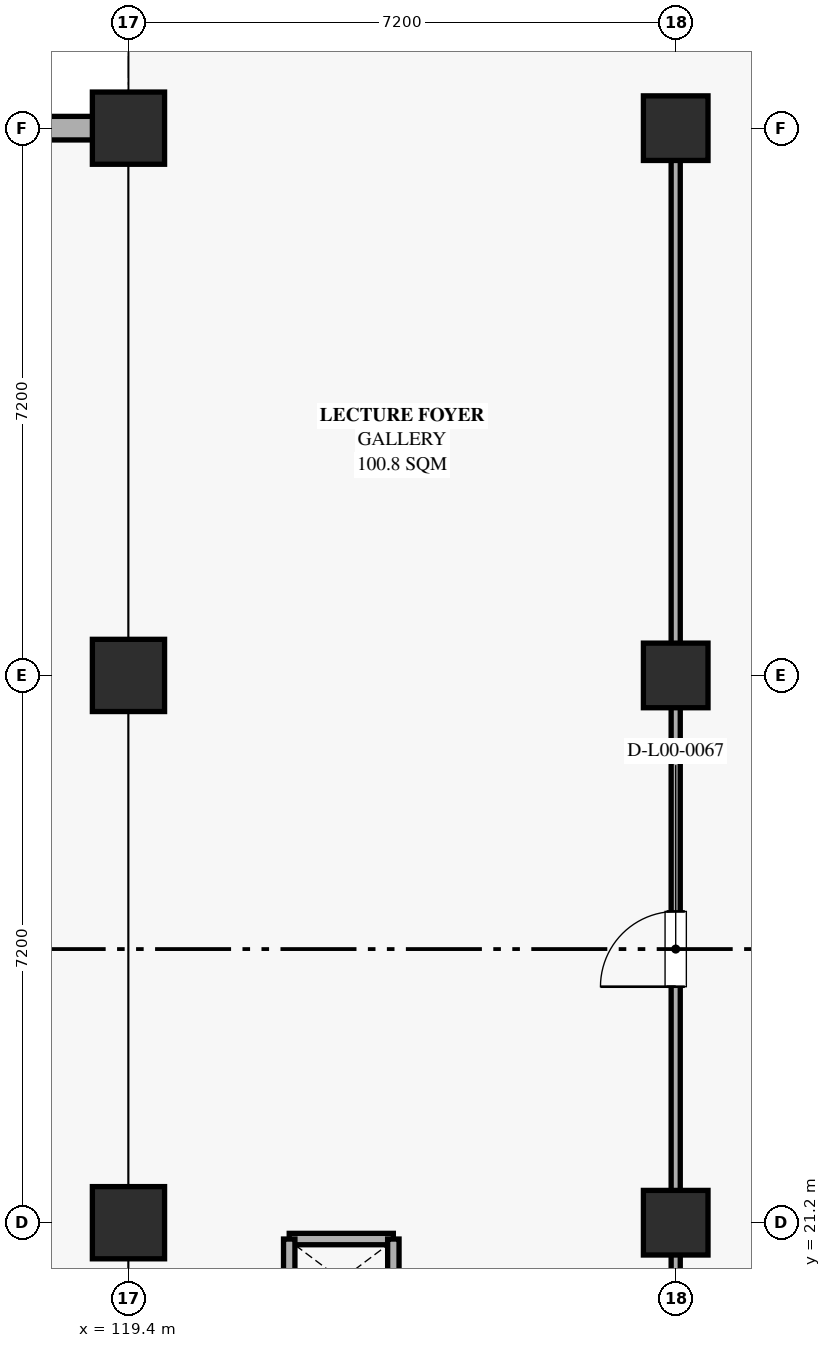
"""IFC4 building model, lengths in metres.
Left out: names, types, materials, properties, quantities, classifications, styles, units other than length and angle.
Written with IfcOpenShell. Run it as: python <this file> out.ifc"""

import sys

from ifc_helpers import new_model, si_unit, direction, frame, frame_2d, origin, origin_2d, place, context, subcontext, project, spatial, rectangle, extrude, element, fill, save


model = new_model("IFC4")
c1 = context("Model", 3, precision=1e-05, world=origin(), true_north=direction((0.0, 1.0)))
c2 = subcontext(c1, "Body", "Model", "MODEL_VIEW")
j1 = project(units=[si_unit("LENGTHUNIT", "METRE"), si_unit("PLANEANGLEUNIT", "RADIAN")], contexts=[c1])
p1 = place(None, origin())
s1 = spatial("IfcSite", under=j1, at=p1, CompositionType="ELEMENT")
p2 = place(p1, origin())
s2 = spatial("IfcBuilding", under=s1, at=p2, CompositionType="ELEMENT")
p3 = place(p2, origin())
s3 = spatial("IfcBuildingStorey", under=s2, at=p3, CompositionType="ELEMENT", Elevation=0.0)
p4 = place(p3, frame((119.4, 21.2, 0.0), z_axis=(0.0, 0.0, 1.0), x_axis=(1.0, 0.0, 0.0)))
e1 = element("IfcColumn", 1, at=p4, inside=s3, PredefinedType="COLUMN", context=c2, shape_type="SweptSolid", body=[
    extrude(rectangle(XDim=0.95, YDim=0.95, at=origin_2d()), origin(), (0.0, 0.0, 1.0), 5.4),
])
p5 = place(p3, frame((126.6, 21.2, 0.0), z_axis=(0.0, 0.0, 1.0), x_axis=(1.0, 0.0, 0.0)))
e2 = element("IfcColumn", 2, at=p5, inside=s3, PredefinedType="COLUMN", context=c2, shape_type="SweptSolid", body=[
    extrude(rectangle(XDim=0.85, YDim=0.85, at=origin_2d()), origin(), (0.0, 0.0, 1.0), 5.4),
])
p6 = place(p3, frame((119.4, 28.4, 0.0), z_axis=(0.0, 0.0, 1.0), x_axis=(1.0, 0.0, 0.0)))
e3 = element("IfcColumn", 3, at=p6, inside=s3, PredefinedType="COLUMN", context=c2, shape_type="SweptSolid", body=[
    extrude(rectangle(XDim=0.95, YDim=0.95, at=origin_2d()), origin(), (0.0, 0.0, 1.0), 5.4),
])
p7 = place(p3, frame((126.6, 28.4, 0.0), z_axis=(0.0, 0.0, 1.0), x_axis=(1.0, 0.0, 0.0)))
e4 = element("IfcColumn", 4, at=p7, inside=s3, PredefinedType="COLUMN", context=c2, shape_type="SweptSolid", body=[
    extrude(rectangle(XDim=0.85, YDim=0.85, at=origin_2d()), origin(), (0.0, 0.0, 1.0), 5.4),
])
p8 = place(p3, frame((119.4, 35.6, 0.0), z_axis=(0.0, 0.0, 1.0), x_axis=(1.0, 0.0, 0.0)))
e5 = element("IfcColumn", 5, at=p8, inside=s3, PredefinedType="COLUMN", context=c2, shape_type="SweptSolid", body=[
    extrude(rectangle(XDim=0.95, YDim=0.95, at=origin_2d()), origin(), (0.0, 0.0, 1.0), 5.4),
])
p9 = place(p3, frame((126.6, 35.6, 0.0), z_axis=(0.0, 0.0, 1.0), x_axis=(1.0, 0.0, 0.0)))
e6 = element("IfcColumn", 6, at=p9, inside=s3, PredefinedType="COLUMN", context=c2, shape_type="SweptSolid", body=[
    extrude(rectangle(XDim=0.85, YDim=0.85, at=origin_2d()), origin(), (0.0, 0.0, 1.0), 5.4),
])
p10 = place(p3, frame((112.66, 35.6, 0.0), z_axis=(0.0, 0.0, 1.0), x_axis=(1.0, 0.0, 0.0)))
e7 = element("IfcWall", 7, at=p10, inside=s3, PredefinedType="SOLIDWALL", context=c2, shape_type="SweptSolid", body=[
    extrude(rectangle(XDim=6.28, YDim=0.31, at=frame_2d((3.14, 0.0))), origin(), (0.0, 0.0, 1.0), 3.9),
])
p11 = place(p10, frame((2.04, 0.0, 0.9)))
e8 = element("IfcOpeningElement", 8, at=p11, cuts=e7, PredefinedType="OPENING", context=c2, shape_type="SweptSolid", body=[
    extrude(rectangle(XDim=2.2, YDim=2.0, at=frame_2d((1.1, 1.0))), frame((0.0, 0.165, 0.0), z_axis=(0.0, -1.0, 0.0), x_axis=(1.0, 0.0, 0.0)), (0.0, 0.0, 1.0), 0.33),
])
p12 = place(p3, frame((121.515, 20.985, 0.0), z_axis=(0.0, 0.0, 1.0), x_axis=(1.0, 0.0, 0.0)))
e9 = element("IfcWall", 9, at=p12, inside=s3, PredefinedType="PARTITIONING", context=c2, shape_type="SweptSolid", body=[
    extrude(rectangle(XDim=1.37, YDim=0.15, at=frame_2d((0.685, 0.0))), origin(), (0.0, 0.0, 1.0), 3.88),
])
for number, where, z_axis, x_axis in (
    (10, (121.515, 19.915, 0.0), (0.0, 0.0, 1.0), (0.0, 1.0, 0.0)),
    (11, (122.885, 20.985, 0.0), (0.0, 0.0, 1.0), (0.0, -1.0, 0.0)),
):
    element("IfcWall", number, at=place(p3, frame(where, z_axis=z_axis, x_axis=x_axis)), inside=s3, PredefinedType="PARTITIONING", context=c2, shape_type="SweptSolid", body=[
        extrude(rectangle(XDim=1.07, YDim=0.15, at=frame_2d((0.535, 0.0))), origin(), (0.0, 0.0, 1.0), 3.88),
    ])
p13 = place(p3, frame((126.6, 14.15, 0.0), z_axis=(0.0, 0.0, 1.0), x_axis=(0.0, 1.0, 0.0)))
e12 = element("IfcWall", 12, at=p13, inside=s3, PredefinedType="PARTITIONING", context=c2, shape_type="SweptSolid", body=[
    extrude(rectangle(XDim=21.3, YDim=0.12, at=frame_2d((10.65, 0.0))), origin(), (0.0, 0.0, 1.0), 3.88),
])
p14 = place(p13, frame((10.155, 0.0, 0.0)))
e13 = element("IfcOpeningElement", 13, at=p14, cuts=e12, PredefinedType="OPENING", context=c2, shape_type="SweptSolid", body=[
    extrude(rectangle(XDim=0.99, YDim=2.05, at=frame_2d((0.495, 1.025))), frame((0.0, 0.07, 0.0), z_axis=(0.0, -1.0, 0.0), x_axis=(1.0, 0.0, 0.0)), (0.0, 0.0, 1.0), 0.14),
])
p15 = place(p14, origin())
e14 = element("IfcDoor", 14, at=p15, inside=s3, OperationType="SINGLE_SWING_LEFT", PredefinedType="DOOR", context=c2, shape_type="SweptSolid", body=[
    extrude(rectangle(XDim=0.99, YDim=2.05, at=frame_2d((0.495, 1.025))), frame((0.0, 0.025, 0.0), z_axis=(0.0, -1.0, 0.0), x_axis=(1.0, 0.0, 0.0)), (0.0, 0.0, 1.0), 0.05),
])
fill(e13, e14)
save(model, sys.argv[1])
